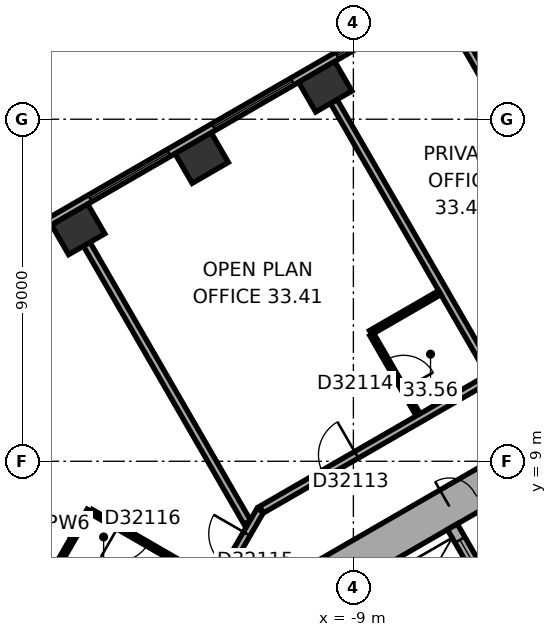
"""IFC4 building model, lengths in metres.
Left out: names, types, materials, properties, quantities, classifications, styles, units other than length and angle.
Written with IfcOpenShell. Run it as: python <this file> out.ifc"""

import sys

from ifc_helpers import new_model, si_unit, direction, frame, frame_2d, origin, origin_2d, place, context, subcontext, project, spatial, rectangle, extrude, element, fill, save


model = new_model("IFC4")
c1 = context("Model", 3, precision=1e-05, world=origin(), true_north=direction((0.0, 1.0)))
c2 = subcontext(c1, "Body", "Model", "MODEL_VIEW")
j1 = project(units=[si_unit("LENGTHUNIT", "METRE"), si_unit("PLANEANGLEUNIT", "RADIAN")], contexts=[c1])
p1 = place(None, origin())
s1 = spatial("IfcSite", under=j1, at=p1, CompositionType="ELEMENT")
p2 = place(p1, origin())
s2 = spatial("IfcBuilding", under=s1, at=p2, CompositionType="ELEMENT")
p3 = place(p2, frame((0.0, 0.0, 135.5)))
s3 = spatial("IfcBuildingStorey", under=s2, at=p3, CompositionType="ELEMENT", Elevation=135.5)
for number, where, z_axis, x_axis in (
    (1, (-9.74, 18.856, 0.0), (0.0, 0.0, 1.0), (-0.866, -0.5, 0.0)),
    (2, (-12.991, 16.979, 0.0), (0.0, 0.0, 1.0), (-0.866, -0.5, 0.0)),
    (3, (-16.242, 15.102, 0.0), (0.0, 0.0, 1.0), (-0.866, -0.5, 0.0)),
):
    element("IfcColumn", number, at=place(p3, frame(where, z_axis=z_axis, x_axis=x_axis)), inside=s3, PredefinedType="COLUMN", context=c2, shape_type="SweptSolid", body=[
        extrude(rectangle(XDim=1.1, YDim=0.9, at=origin_2d()), origin(), (0.0, 0.0, 1.0), 3.7),
    ])
p4 = place(p3, frame((0.25, 11.691, 0.0), z_axis=(0.0, 0.0, 1.0), x_axis=(-0.866022616891, -0.50000482701, 0.0)))
e4 = element("IfcWall", 4, at=p4, inside=s3, PredefinedType="SHEAR", context=c2, shape_type="SweptSolid", body=[
    extrude(rectangle(XDim=12.125, YDim=1.0, at=frame_2d((6.062, 0.0))), origin(), (0.0, 0.0, 1.0), 3.7),
])
p5 = place(p4, frame((6.262, 0.0, 0.0)))
e5 = element("IfcOpeningElement", 5, at=p5, cuts=e4, PredefinedType="OPENING", context=c2, shape_type="SweptSolid", body=[
    extrude(rectangle(XDim=1.5, YDim=2.1, at=frame_2d((0.75, 1.05))), frame((0.0, 0.51, 0.0), z_axis=(0.0, -1.0, 0.0), x_axis=(1.0, 0.0, 0.0)), (0.0, 0.0, 1.0), 1.02),
])
p6 = place(p4, frame((1.712, 0.0, 0.0)))
e6 = element("IfcOpeningElement", 6, at=p6, cuts=e4, PredefinedType="OPENING", context=c2, shape_type="SweptSolid", body=[
    extrude(rectangle(XDim=1.1, YDim=2.1, at=frame_2d((0.55, 1.05))), frame((0.0, 0.51, 0.0), z_axis=(0.0, -1.0, 0.0), x_axis=(1.0, 0.0, 0.0)), (0.0, 0.0, 1.0), 1.02),
])
p7 = place(p3, frame((-2.961, 23.405, 0.0), z_axis=(0.0, 0.0, 1.0), x_axis=(-0.866023315909, -0.500003616288, 0.0)))
e7 = element("IfcWall", 7, at=p7, inside=s3, PredefinedType="STANDARD", context=c2, shape_type="SweptSolid", body=[
    extrude(rectangle(XDim=20.044, YDim=0.2, at=frame_2d((10.022, 0.0))), origin(), (0.0, 0.0, 1.0), 3.7),
])
p8 = place(p7, frame((1.314, 0.0, 0.9)))
e8 = element("IfcOpeningElement", 8, at=p8, cuts=e7, PredefinedType="OPENING", context=c2, shape_type="SweptSolid", body=[
    extrude(rectangle(XDim=2.4, YDim=2.0, at=frame_2d((1.2, 1.0))), frame((0.0, 0.11, 0.0), z_axis=(0.0, -1.0, 0.0), x_axis=(1.0, 0.0, 0.0)), (0.0, 0.0, 1.0), 0.22),
])
p9 = place(p7, frame((5.069, 0.0, 0.9)))
e9 = element("IfcOpeningElement", 9, at=p9, cuts=e7, PredefinedType="OPENING", context=c2, shape_type="SweptSolid", body=[
    extrude(rectangle(XDim=2.4, YDim=2.0, at=frame_2d((1.2, 1.0))), frame((0.0, 0.11, 0.0), z_axis=(0.0, -1.0, 0.0), x_axis=(1.0, 0.0, 0.0)), (0.0, 0.0, 1.0), 0.22),
])
p10 = place(p7, frame((8.823, 0.0, 0.9)))
e10 = element("IfcOpeningElement", 10, at=p10, cuts=e7, PredefinedType="OPENING", context=c2, shape_type="SweptSolid", body=[
    extrude(rectangle(XDim=2.4, YDim=2.0, at=frame_2d((1.2, 1.0))), frame((0.0, 0.11, 0.0), z_axis=(0.0, -1.0, 0.0), x_axis=(1.0, 0.0, 0.0)), (0.0, 0.0, 1.0), 0.22),
])
p11 = place(p7, frame((12.577, 0.0, 0.9)))
e11 = element("IfcOpeningElement", 11, at=p11, cuts=e7, PredefinedType="OPENING", context=c2, shape_type="SweptSolid", body=[
    extrude(rectangle(XDim=2.4, YDim=2.0, at=frame_2d((1.2, 1.0))), frame((0.0, 0.11, 0.0), z_axis=(0.0, -1.0, 0.0), x_axis=(1.0, 0.0, 0.0)), (0.0, 0.0, 1.0), 0.22),
])
p12 = place(p7, frame((16.331, 0.0, 0.9)))
e12 = element("IfcOpeningElement", 12, at=p12, cuts=e7, PredefinedType="OPENING", context=c2, shape_type="SweptSolid", body=[
    extrude(rectangle(XDim=2.4, YDim=2.0, at=frame_2d((1.2, 1.0))), frame((0.0, 0.11, 0.0), z_axis=(0.0, -1.0, 0.0), x_axis=(1.0, 0.0, 0.0)), (0.0, 0.0, 1.0), 0.22),
])
p13 = place(p3, frame((-5.295, 5.372, 0.0), z_axis=(0.0, 0.0, 1.0), x_axis=(-0.500077893725, 0.86598042715, 0.0)))
e13 = element("IfcWall", 13, at=p13, inside=s3, PredefinedType="SHEAR", context=c2, shape_type="SweptSolid", body=[
    extrude(rectangle(XDim=2.2, YDim=0.3, at=frame_2d((1.1, 0.0))), origin(), (0.0, 0.0, 1.0), 3.35),
])
p14 = place(p13, frame((0.7, 0.0, 0.0)))
e14 = element("IfcOpeningElement", 14, at=p14, cuts=e13, PredefinedType="OPENING", context=c2, shape_type="SweptSolid", body=[
    extrude(rectangle(XDim=1.1, YDim=2.1, at=frame_2d((0.55, 1.05))), frame((0.0, 0.16, 0.0), z_axis=(0.0, -1.0, 0.0), x_axis=(1.0, 0.0, 0.0)), (0.0, 0.0, 1.0), 0.32),
])
p15 = place(p3, frame((-17.052, 5.804, 0.0), z_axis=(0.0, 0.0, 1.0), x_axis=(0.50002983664, 0.866008176907, 0.0)))
e15 = element("IfcWall", 15, at=p15, inside=s3, PredefinedType="PARTITIONING", context=c2, shape_type="SweptSolid", body=[
    extrude(rectangle(XDim=2.2, YDim=0.12, at=frame_2d((1.1, 0.0))), origin(), (0.0, 0.0, 1.0), 3.35),
])
p16 = place(p3, frame((-16.018, 14.712, 0.0), z_axis=(0.0, 0.0, 1.0), x_axis=(0.500000843414, -0.866024916838, 0.0)))
e16 = element("IfcWall", 16, at=p16, inside=s3, PredefinedType="PARTITIONING", context=c2, shape_type="SweptSolid", body=[
    extrude(rectangle(XDim=8.452, YDim=0.2, at=frame_2d((4.226, 0.0))), origin(), (0.0, 0.0, 1.0), 3.35),
])
p17 = place(p3, frame((-15.9, 7.679, 0.0), z_axis=(0.0, 0.0, 1.0), x_axis=(0.866022320763, -0.500005339912, 0.0)))
e17 = element("IfcWall", 17, at=p17, inside=s3, PredefinedType="PARTITIONING", context=c2, shape_type="SweptSolid", body=[
    extrude(rectangle(XDim=2.54, YDim=0.12, at=frame_2d((1.27, 0.0))), origin(), (0.0, 0.0, 1.0), 3.35),
])
p18 = place(p17, frame((0.82, 0.0, 0.0)))
e18 = element("IfcOpeningElement", 18, at=p18, cuts=e17, PredefinedType="OPENING", context=c2, shape_type="SweptSolid", body=[
    extrude(rectangle(XDim=0.9, YDim=2.1, at=frame_2d((0.45, 1.05))), frame((0.0, 0.07, 0.0), z_axis=(0.0, -1.0, 0.0), x_axis=(1.0, 0.0, 0.0)), (0.0, 0.0, 1.0), 0.14),
])
p19 = place(p3, frame((-11.45, 7.708, 0.0), z_axis=(0.0, 0.0, 1.0), x_axis=(-0.500022797313, -0.86601224135, 0.0)))
e19 = element("IfcWall", 19, at=p19, inside=s3, PredefinedType="PARTITIONING", context=c2, shape_type="SweptSolid", body=[
    extrude(rectangle(XDim=1.9, YDim=0.2, at=frame_2d((0.95, 0.0))), origin(), (0.0, 0.0, 1.0), 3.35),
])
p20 = place(p19, frame((0.712, 0.0, 0.0)))
e20 = element("IfcOpeningElement", 20, at=p20, cuts=e19, PredefinedType="OPENING", context=c2, shape_type="SweptSolid", body=[
    extrude(rectangle(XDim=1.0, YDim=2.1, at=frame_2d((0.5, 1.05))), frame((0.0, 0.11, 0.0), z_axis=(0.0, -1.0, 0.0), x_axis=(1.0, 0.0, 0.0)), (0.0, 0.0, 1.0), 0.22),
])
p21 = place(p3, frame((-9.515, 18.466, 0.0), z_axis=(0.0, 0.0, 1.0), x_axis=(0.500009360108, -0.866019999656, 0.0)))
e21 = element("IfcWall", 21, at=p21, inside=s3, PredefinedType="PARTITIONING", context=c2, shape_type="SweptSolid", body=[
    extrude(rectangle(XDim=8.25, YDim=0.2, at=frame_2d((4.125, 0.0))), origin(), (0.0, 0.0, 1.0), 2.55),
])
p22 = place(p3, frame((-8.545, 12.387, 0.0), z_axis=(0.0, 0.0, 1.0), x_axis=(0.866009402589, 0.500027713859, 0.0)))
e22 = element("IfcWall", 22, at=p22, inside=s3, PredefinedType="PARTITIONING", context=c2, shape_type="SweptSolid", body=[
    extrude(rectangle(XDim=2.1, YDim=0.12, at=frame_2d((1.05, 0.0))), origin(), (0.0, 0.0, 1.0), 3.35),
])
p23 = place(p3, frame((-7.295, 10.222, 0.0), z_axis=(0.0, 0.0, 1.0), x_axis=(-0.500002508028, 0.866023955769, 0.0)))
e23 = element("IfcWall", 23, at=p23, inside=s3, PredefinedType="PARTITIONING", context=c2, shape_type="SweptSolid", body=[
    extrude(rectangle(XDim=2.44, YDim=0.12, at=frame_2d((1.22, 0.0))), origin(), (0.0, 0.0, 1.0), 3.35),
])
p24 = place(p23, frame((0.77, 0.0, 0.0)))
e24 = element("IfcOpeningElement", 24, at=p24, cuts=e23, PredefinedType="OPENING", context=c2, shape_type="SweptSolid", body=[
    extrude(rectangle(XDim=0.9, YDim=2.1, at=frame_2d((0.45, 1.05))), frame((0.0, 0.07, 0.0), z_axis=(0.0, -1.0, 0.0), x_axis=(1.0, 0.0, 0.0)), (0.0, 0.0, 1.0), 0.14),
])
p25 = place(p3, frame((-6.264, 20.344, 0.0), z_axis=(0.0, 0.0, 1.0), x_axis=(0.500009260695, -0.866020057054, 0.0)))
e25 = element("IfcWall", 25, at=p25, inside=s3, PredefinedType="PARTITIONING", context=c2, shape_type="SweptSolid", body=[
    extrude(rectangle(XDim=7.049, YDim=0.2, at=frame_2d((3.524, 0.0))), origin(), (0.0, 0.0, 1.0), 3.35),
])
p26 = place(p3, frame((-4.209, 11.888, 0.0), z_axis=(0.0, 0.0, 1.0), x_axis=(-0.866020930448, -0.500007747966, 0.0)))
e26 = element("IfcWall", 26, at=p26, inside=s3, PredefinedType="PARTITIONING", context=c2, shape_type="SweptSolid", body=[
    extrude(rectangle(XDim=8.321, YDim=0.2, at=frame_2d((4.161, 0.0))), origin(), (0.0, 0.0, 1.0), 3.35),
])
p27 = place(p26, frame((5.439, 0.0, 0.0)))
e27 = element("IfcOpeningElement", 27, at=p27, cuts=e26, PredefinedType="OPENING", context=c2, shape_type="SweptSolid", body=[
    extrude(rectangle(XDim=1.0, YDim=2.1, at=frame_2d((0.5, 1.05))), frame((0.0, 0.11, 0.0), z_axis=(0.0, -1.0, 0.0), x_axis=(1.0, 0.0, 0.0)), (0.0, 0.0, 1.0), 0.22),
])
p28 = place(p9, origin())
e28 = element("IfcWindow", 28, at=p28, inside=s3, PartitioningType="SINGLE_PANEL", PredefinedType="WINDOW", context=c2, shape_type="SweptSolid", body=[
    extrude(rectangle(XDim=2.4, YDim=2.0, at=frame_2d((1.2, 1.0))), frame((0.0, 0.03, 0.0), z_axis=(0.0, -1.0, 0.0), x_axis=(1.0, 0.0, 0.0)), (0.0, 0.0, 1.0), 0.06),
])
fill(e9, e28)
p29 = place(p10, origin())
e29 = element("IfcWindow", 29, at=p29, inside=s3, PartitioningType="SINGLE_PANEL", PredefinedType="WINDOW", context=c2, shape_type="SweptSolid", body=[
    extrude(rectangle(XDim=2.4, YDim=2.0, at=frame_2d((1.2, 1.0))), frame((0.0, 0.03, 0.0), z_axis=(0.0, -1.0, 0.0), x_axis=(1.0, 0.0, 0.0)), (0.0, 0.0, 1.0), 0.06),
])
fill(e10, e29)
p30 = place(p11, origin())
e30 = element("IfcWindow", 30, at=p30, inside=s3, PartitioningType="SINGLE_PANEL", PredefinedType="WINDOW", context=c2, shape_type="SweptSolid", body=[
    extrude(rectangle(XDim=2.4, YDim=2.0, at=frame_2d((1.2, 1.0))), frame((0.0, 0.03, 0.0), z_axis=(0.0, -1.0, 0.0), x_axis=(1.0, 0.0, 0.0)), (0.0, 0.0, 1.0), 0.06),
])
fill(e11, e30)
p31 = place(p5, origin())
e31 = element("IfcDoor", 31, at=p31, inside=s3, OperationType="DOUBLE_DOOR_SINGLE_SWING", PredefinedType="DOOR", context=c2, shape_type="SweptSolid", body=[
    extrude(rectangle(XDim=1.5, YDim=2.1, at=frame_2d((0.75, 1.05))), frame((0.0, 0.025, 0.0), z_axis=(0.0, -1.0, 0.0), x_axis=(1.0, 0.0, 0.0)), (0.0, 0.0, 1.0), 0.05),
])
fill(e5, e31)
p32 = place(p14, origin())
e32 = element("IfcDoor", 32, at=p32, inside=s3, OperationType="DOUBLE_DOOR_SLIDING", PredefinedType="DOOR", context=c2, shape_type="SweptSolid", body=[
    extrude(rectangle(XDim=1.1, YDim=2.1, at=frame_2d((0.55, 1.05))), frame((0.0, 0.025, 0.0), z_axis=(0.0, -1.0, 0.0), x_axis=(1.0, 0.0, 0.0)), (0.0, 0.0, 1.0), 0.05),
])
fill(e14, e32)
p33 = place(p27, origin())
e33 = element("IfcDoor", 33, at=p33, inside=s3, OperationType="SINGLE_SWING_LEFT", PredefinedType="DOOR", context=c2, shape_type="SweptSolid", body=[
    extrude(rectangle(XDim=1.0, YDim=2.1, at=frame_2d((0.5, 1.05))), frame((0.0, 0.025, 0.0), z_axis=(0.0, -1.0, 0.0), x_axis=(1.0, 0.0, 0.0)), (0.0, 0.0, 1.0), 0.05),
])
fill(e27, e33)
p34 = place(p24, origin())
e34 = element("IfcDoor", 34, at=p34, inside=s3, OperationType="SINGLE_SWING_LEFT", PredefinedType="DOOR", context=c2, shape_type="SweptSolid", body=[
    extrude(rectangle(XDim=0.9, YDim=2.1, at=frame_2d((0.45, 1.05))), frame((0.0, 0.025, 0.0), z_axis=(0.0, -1.0, 0.0), x_axis=(1.0, 0.0, 0.0)), (0.0, 0.0, 1.0), 0.05),
])
fill(e24, e34)
p35 = place(p20, origin())
e35 = element("IfcDoor", 35, at=p35, inside=s3, OperationType="SINGLE_SWING_LEFT", PredefinedType="DOOR", context=c2, shape_type="SweptSolid", body=[
    extrude(rectangle(XDim=1.0, YDim=2.1, at=frame_2d((0.5, 1.05))), frame((0.0, 0.025, 0.0), z_axis=(0.0, -1.0, 0.0), x_axis=(1.0, 0.0, 0.0)), (0.0, 0.0, 1.0), 0.05),
])
fill(e20, e35)
p36 = place(p18, origin())
e36 = element("IfcDoor", 36, at=p36, inside=s3, OperationType="SINGLE_SWING_LEFT", PredefinedType="DOOR", context=c2, shape_type="SweptSolid", body=[
    extrude(rectangle(XDim=0.9, YDim=2.1, at=frame_2d((0.45, 1.05))), frame((0.0, 0.025, 0.0), z_axis=(0.0, -1.0, 0.0), x_axis=(1.0, 0.0, 0.0)), (0.0, 0.0, 1.0), 0.05),
])
fill(e18, e36)
save(model, sys.argv[1])
